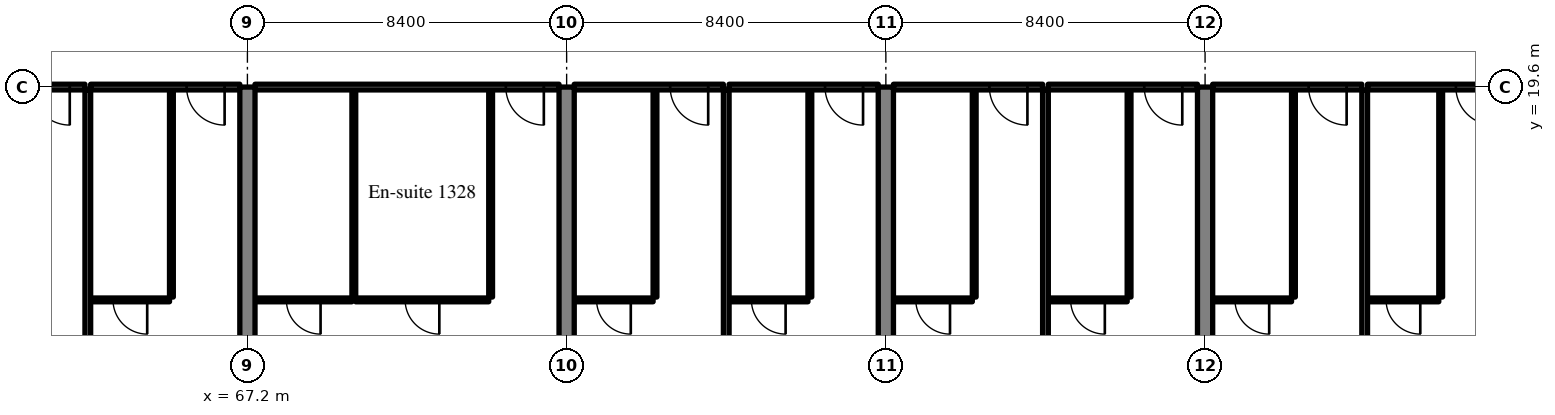
"""IFC4 building model, lengths in metres.
Left out: names, types, materials, properties, quantities, classifications, styles, units other than length and angle.
Written with IfcOpenShell. Run it as: python <this file> out.ifc"""

import sys

from ifc_helpers import new_model, si_unit, direction, frame, frame_2d, origin, place, context, subcontext, project, spatial, rectangle, extrude, source, transform, mapped, element, fill, save


model = new_model("IFC4")
c1 = context("Model", 3, precision=1e-05, world=origin(), true_north=direction((0.0, 1.0)))
c2 = subcontext(c1, "Body", "Model", "MODEL_VIEW")
j1 = project(units=[si_unit("LENGTHUNIT", "METRE"), si_unit("PLANEANGLEUNIT", "RADIAN")], contexts=[c1])
p1 = place(None, origin())
s1 = spatial("IfcSite", under=j1, at=p1, CompositionType="ELEMENT")
p2 = place(p1, origin())
s2 = spatial("IfcBuilding", under=s1, at=p2, CompositionType="ELEMENT")
p3 = place(p2, frame((0.0, 0.0, 58.2)))
s3 = spatial("IfcBuildingStorey", under=s2, at=p3, CompositionType="ELEMENT", Elevation=58.2)
m1 = source(origin(), c2, "Body", "SweptSolid", [
    extrude(rectangle(XDim=19.6, YDim=0.4, at=frame_2d((9.8, 0.0))), origin(), (0.0, 0.0, 1.0), 3.52),
])
for number, where, z_axis, x_axis in (
    (1, (67.2, 0.0, 0.0), (0.0, 0.0, 1.0), (0.0, 1.0, 0.0)),
    (2, (75.6, 0.0, 0.0), (0.0, 0.0, 1.0), (0.0, 1.0, 0.0)),
    (3, (84.0, 0.0, 0.0), (0.0, 0.0, 1.0), (0.0, 1.0, 0.0)),
    (4, (92.4, 0.0, 0.0), (0.0, 0.0, 1.0), (0.0, 1.0, 0.0)),
):
    element("IfcWall", number, at=place(p3, frame(where, z_axis=z_axis, x_axis=x_axis)), inside=s3, PredefinedType="SHEAR", context=c2, shape_type="MappedRepresentation", body=[
        mapped(m1, transform((0.0, 0.0, 0.0), scale=1.0)),
    ])
m2 = source(origin(), c2, "Body", "SweptSolid", [
    extrude(rectangle(XDim=3.925, YDim=0.15, at=frame_2d((1.962, 0.0))), origin(), (0.0, 0.0, 1.0), 2.82),
])
p4 = place(p3, frame((59.0, 19.6, 0.0), z_axis=(0.0, 0.0, 1.0), x_axis=(1.0, 0.0, 0.0)))
e5 = element("IfcWall", 5, at=p4, inside=s3, PredefinedType="PARTITIONING", context=c2, shape_type="MappedRepresentation", body=[
    mapped(m2, transform((0.0, 0.0, 0.0), scale=1.0)),
])
m3 = source(origin(), c2, "Body", "SweptSolid", [
    extrude(rectangle(XDim=1.0, YDim=2.1, at=frame_2d((0.5, 1.05))), frame((0.0, 0.085, 0.0), z_axis=(0.0, -1.0, 0.0), x_axis=(1.0, 0.0, 0.0)), (0.0, 0.0, 1.0), 0.17),
])
p5 = place(p4, frame((2.525, 0.0, 0.0)))
e6 = element("IfcOpeningElement", 6, at=p5, cuts=e5, PredefinedType="OPENING", context=c2, shape_type="MappedRepresentation", body=[
    mapped(m3, transform((0.0, 0.0, 0.0), scale=1.0)),
])
m4 = source(origin(), c2, "Body", "SweptSolid", [
    extrude(rectangle(XDim=5.45, YDim=0.1, at=frame_2d((2.725, 0.0))), origin(), (0.0, 0.0, 1.0), 3.52),
])
p6 = place(p3, frame((65.2, 14.075, 0.0), z_axis=(0.0, 0.0, 1.0), x_axis=(0.0, 1.0, 0.0)))
e7 = element("IfcWall", 7, at=p6, inside=s3, PredefinedType="PARTITIONING", context=c2, shape_type="MappedRepresentation", body=[
    mapped(m4, transform((0.0, 0.0, 0.0), scale=1.0)),
])
m5 = source(origin(), c2, "Body", "SweptSolid", [
    extrude(rectangle(XDim=2.075, YDim=0.1, at=frame_2d((1.038, 0.0))), origin(), (0.0, 0.0, 1.0), 3.52),
])
p7 = place(p3, frame((63.075, 14.0, 0.0), z_axis=(0.0, 0.0, 1.0), x_axis=(1.0, 0.0, 0.0)))
e8 = element("IfcWall", 8, at=p7, inside=s3, PredefinedType="PARTITIONING", context=c2, shape_type="MappedRepresentation", body=[
    mapped(m5, transform((0.0, 0.0, 0.0), scale=1.0)),
])
m6 = source(origin(), c2, "Body", "SweptSolid", [
    extrude(rectangle(XDim=0.9, YDim=2.1, at=frame_2d((0.45, 1.05))), frame((0.0, 0.06, 0.0), z_axis=(0.0, -1.0, 0.0), x_axis=(1.0, 0.0, 0.0)), (0.0, 0.0, 1.0), 0.12),
])
p8 = place(p7, frame((0.588, 0.0, 0.0)))
e9 = element("IfcOpeningElement", 9, at=p8, cuts=e8, PredefinedType="OPENING", context=c2, shape_type="MappedRepresentation", body=[
    mapped(m6, transform((0.0, 0.0, 0.0), scale=1.0)),
])
p9 = place(p3, frame((63.075, 19.6, 0.0), z_axis=(0.0, 0.0, 1.0), x_axis=(1.0, 0.0, 0.0)))
e10 = element("IfcWall", 10, at=p9, inside=s3, PredefinedType="PARTITIONING", context=c2, shape_type="MappedRepresentation", body=[
    mapped(m2, transform((0.0, 0.0, 0.0), scale=1.0)),
])
p10 = place(p9, frame((2.525, 0.0, 0.0)))
e11 = element("IfcOpeningElement", 11, at=p10, cuts=e10, PredefinedType="OPENING", context=c2, shape_type="MappedRepresentation", body=[
    mapped(m3, transform((0.0, 0.0, 0.0), scale=1.0)),
])
m7 = source(origin(), c2, "Body", "SweptSolid", [
    extrude(rectangle(XDim=20.998, YDim=0.15, at=frame_2d((10.499, 0.0))), origin(), (0.0, 0.0, 1.0), 3.52),
])
p11 = place(p3, frame((63.0, -1.473, 0.0), z_axis=(0.0, 0.0, 1.0), x_axis=(0.0, 1.0, 0.0)))
e12 = element("IfcWall", 12, at=p11, inside=s3, PredefinedType="PARTITIONING", context=c2, shape_type="MappedRepresentation", body=[
    mapped(m7, transform((0.0, 0.0, 0.0), scale=1.0)),
])
for number, where, z_axis, x_axis in (
    (13, (73.6, 14.075, 0.0), (0.0, 0.0, 1.0), (0.0, 1.0, 0.0)),
    (14, (70.0, 14.075, 0.0), (0.0, 0.0, 1.0), (0.0, 1.0, 0.0)),
):
    element("IfcWall", number, at=place(p3, frame(where, z_axis=z_axis, x_axis=x_axis)), inside=s3, PredefinedType="PARTITIONING", context=c2, shape_type="MappedRepresentation", body=[
        mapped(m4, transform((0.0, 0.0, 0.0), scale=1.0)),
    ])
m8 = source(origin(), c2, "Body", "SweptSolid", [
    extrude(rectangle(XDim=3.5, YDim=0.1, at=frame_2d((1.75, 0.0))), origin(), (0.0, 0.0, 1.0), 3.52),
])
p12 = place(p3, frame((70.05, 14.0, 0.0), z_axis=(0.0, 0.0, 1.0), x_axis=(1.0, 0.0, 0.0)))
e15 = element("IfcWall", 15, at=p12, inside=s3, PredefinedType="PARTITIONING", context=c2, shape_type="MappedRepresentation", body=[
    mapped(m8, transform((0.0, 0.0, 0.0), scale=1.0)),
])
p13 = place(p12, frame((1.3, 0.0, 0.0)))
e16 = element("IfcOpeningElement", 16, at=p13, cuts=e15, PredefinedType="OPENING", context=c2, shape_type="MappedRepresentation", body=[
    mapped(m6, transform((0.0, 0.0, 0.0), scale=1.0)),
])
m9 = source(origin(), c2, "Body", "SweptSolid", [
    extrude(rectangle(XDim=2.55, YDim=0.1, at=frame_2d((1.275, 0.0))), origin(), (0.0, 0.0, 1.0), 3.52),
])
p14 = place(p3, frame((67.4, 14.0, 0.0), z_axis=(0.0, 0.0, 1.0), x_axis=(1.0, 0.0, 0.0)))
e17 = element("IfcWall", 17, at=p14, inside=s3, PredefinedType="PARTITIONING", context=c2, shape_type="MappedRepresentation", body=[
    mapped(m9, transform((0.0, 0.0, 0.0), scale=1.0)),
])
p15 = place(p14, frame((0.825, 0.0, 0.0)))
e18 = element("IfcOpeningElement", 18, at=p15, cuts=e17, PredefinedType="OPENING", context=c2, shape_type="MappedRepresentation", body=[
    mapped(m6, transform((0.0, 0.0, 0.0), scale=1.0)),
])
m10 = source(origin(), c2, "Body", "SweptSolid", [
    extrude(rectangle(XDim=8.0, YDim=0.15, at=frame_2d((4.0, 0.0))), origin(), (0.0, 0.0, 1.0), 2.82),
])
p16 = place(p3, frame((67.4, 19.6, 0.0), z_axis=(0.0, 0.0, 1.0), x_axis=(1.0, 0.0, 0.0)))
e19 = element("IfcWall", 19, at=p16, inside=s3, PredefinedType="PARTITIONING", context=c2, shape_type="MappedRepresentation", body=[
    mapped(m10, transform((0.0, 0.0, 0.0), scale=1.0)),
])
p17 = place(p16, frame((6.6, 0.0, 0.0)))
e20 = element("IfcOpeningElement", 20, at=p17, cuts=e19, PredefinedType="OPENING", context=c2, shape_type="MappedRepresentation", body=[
    mapped(m3, transform((0.0, 0.0, 0.0), scale=1.0)),
])
p18 = place(p3, frame((77.925, 14.075, 0.0), z_axis=(0.0, 0.0, 1.0), x_axis=(0.0, 1.0, 0.0)))
e21 = element("IfcWall", 21, at=p18, inside=s3, PredefinedType="PARTITIONING", context=c2, shape_type="MappedRepresentation", body=[
    mapped(m4, transform((0.0, 0.0, 0.0), scale=1.0)),
])
p19 = place(p3, frame((75.8, 14.0, 0.0), z_axis=(0.0, 0.0, 1.0), x_axis=(1.0, 0.0, 0.0)))
e22 = element("IfcWall", 22, at=p19, inside=s3, PredefinedType="PARTITIONING", context=c2, shape_type="MappedRepresentation", body=[
    mapped(m5, transform((0.0, 0.0, 0.0), scale=1.0)),
])
p20 = place(p19, frame((0.588, 0.0, 0.0)))
e23 = element("IfcOpeningElement", 23, at=p20, cuts=e22, PredefinedType="OPENING", context=c2, shape_type="MappedRepresentation", body=[
    mapped(m6, transform((0.0, 0.0, 0.0), scale=1.0)),
])
p21 = place(p3, frame((75.8, 19.6, 0.0), z_axis=(0.0, 0.0, 1.0), x_axis=(1.0, 0.0, 0.0)))
e24 = element("IfcWall", 24, at=p21, inside=s3, PredefinedType="PARTITIONING", context=c2, shape_type="MappedRepresentation", body=[
    mapped(m2, transform((0.0, 0.0, 0.0), scale=1.0)),
])
p22 = place(p21, frame((2.525, 0.0, 0.0)))
e25 = element("IfcOpeningElement", 25, at=p22, cuts=e24, PredefinedType="OPENING", context=c2, shape_type="MappedRepresentation", body=[
    mapped(m3, transform((0.0, 0.0, 0.0), scale=1.0)),
])
p23 = place(p3, frame((82.0, 14.075, 0.0), z_axis=(0.0, 0.0, 1.0), x_axis=(0.0, 1.0, 0.0)))
e26 = element("IfcWall", 26, at=p23, inside=s3, PredefinedType="PARTITIONING", context=c2, shape_type="MappedRepresentation", body=[
    mapped(m4, transform((0.0, 0.0, 0.0), scale=1.0)),
])
p24 = place(p3, frame((79.875, 14.0, 0.0), z_axis=(0.0, 0.0, 1.0), x_axis=(1.0, 0.0, 0.0)))
e27 = element("IfcWall", 27, at=p24, inside=s3, PredefinedType="PARTITIONING", context=c2, shape_type="MappedRepresentation", body=[
    mapped(m5, transform((0.0, 0.0, 0.0), scale=1.0)),
])
p25 = place(p24, frame((0.587, 0.0, 0.0)))
e28 = element("IfcOpeningElement", 28, at=p25, cuts=e27, PredefinedType="OPENING", context=c2, shape_type="MappedRepresentation", body=[
    mapped(m6, transform((0.0, 0.0, 0.0), scale=1.0)),
])
p26 = place(p3, frame((79.875, 19.6, 0.0), z_axis=(0.0, 0.0, 1.0), x_axis=(1.0, 0.0, 0.0)))
e29 = element("IfcWall", 29, at=p26, inside=s3, PredefinedType="PARTITIONING", context=c2, shape_type="MappedRepresentation", body=[
    mapped(m2, transform((0.0, 0.0, 0.0), scale=1.0)),
])
p27 = place(p26, frame((2.525, 0.0, 0.0)))
e30 = element("IfcOpeningElement", 30, at=p27, cuts=e29, PredefinedType="OPENING", context=c2, shape_type="MappedRepresentation", body=[
    mapped(m3, transform((0.0, 0.0, 0.0), scale=1.0)),
])
m11 = source(origin(), c2, "Body", "SweptSolid", [
    extrude(rectangle(XDim=18.725, YDim=0.15, at=frame_2d((9.362, 0.0))), origin(), (0.0, 0.0, 1.0), 3.52),
])
p28 = place(p3, frame((79.8, 0.8, 0.0), z_axis=(0.0, 0.0, 1.0), x_axis=(0.0, 1.0, 0.0)))
e31 = element("IfcWall", 31, at=p28, inside=s3, PredefinedType="PARTITIONING", context=c2, shape_type="MappedRepresentation", body=[
    mapped(m11, transform((0.0, 0.0, 0.0), scale=1.0)),
])
p29 = place(p3, frame((86.325, 14.075, 0.0), z_axis=(0.0, 0.0, 1.0), x_axis=(0.0, 1.0, 0.0)))
e32 = element("IfcWall", 32, at=p29, inside=s3, PredefinedType="PARTITIONING", context=c2, shape_type="MappedRepresentation", body=[
    mapped(m4, transform((0.0, 0.0, 0.0), scale=1.0)),
])
p30 = place(p3, frame((84.2, 14.0, 0.0), z_axis=(0.0, 0.0, 1.0), x_axis=(1.0, 0.0, 0.0)))
e33 = element("IfcWall", 33, at=p30, inside=s3, PredefinedType="PARTITIONING", context=c2, shape_type="MappedRepresentation", body=[
    mapped(m5, transform((0.0, 0.0, 0.0), scale=1.0)),
])
p31 = place(p30, frame((0.588, 0.0, 0.0)))
e34 = element("IfcOpeningElement", 34, at=p31, cuts=e33, PredefinedType="OPENING", context=c2, shape_type="MappedRepresentation", body=[
    mapped(m6, transform((0.0, 0.0, 0.0), scale=1.0)),
])
p32 = place(p3, frame((84.2, 19.6, 0.0), z_axis=(0.0, 0.0, 1.0), x_axis=(1.0, 0.0, 0.0)))
e35 = element("IfcWall", 35, at=p32, inside=s3, PredefinedType="PARTITIONING", context=c2, shape_type="MappedRepresentation", body=[
    mapped(m2, transform((0.0, 0.0, 0.0), scale=1.0)),
])
p33 = place(p32, frame((2.525, 0.0, 0.0)))
e36 = element("IfcOpeningElement", 36, at=p33, cuts=e35, PredefinedType="OPENING", context=c2, shape_type="MappedRepresentation", body=[
    mapped(m3, transform((0.0, 0.0, 0.0), scale=1.0)),
])
p34 = place(p3, frame((90.4, 14.075, 0.0), z_axis=(0.0, 0.0, 1.0), x_axis=(0.0, 1.0, 0.0)))
e37 = element("IfcWall", 37, at=p34, inside=s3, PredefinedType="PARTITIONING", context=c2, shape_type="MappedRepresentation", body=[
    mapped(m4, transform((0.0, 0.0, 0.0), scale=1.0)),
])
m12 = source(origin(), c2, "Body", "SweptSolid", [
    extrude(rectangle(XDim=2.075, YDim=0.1, at=frame_2d((1.038, 0.0))), origin(), (0.0, 0.0, 1.0), 3.52),
])
p35 = place(p3, frame((88.275, 14.0, 0.0), z_axis=(0.0, 0.0, 1.0), x_axis=(1.0, 0.0, 0.0)))
e38 = element("IfcWall", 38, at=p35, inside=s3, PredefinedType="PARTITIONING", context=c2, shape_type="MappedRepresentation", body=[
    mapped(m12, transform((0.0, 0.0, 0.0), scale=1.0)),
])
p36 = place(p35, frame((0.587, 0.0, 0.0)))
e39 = element("IfcOpeningElement", 39, at=p36, cuts=e38, PredefinedType="OPENING", context=c2, shape_type="MappedRepresentation", body=[
    mapped(m6, transform((0.0, 0.0, 0.0), scale=1.0)),
])
p37 = place(p3, frame((88.275, 19.6, 0.0), z_axis=(0.0, 0.0, 1.0), x_axis=(1.0, 0.0, 0.0)))
e40 = element("IfcWall", 40, at=p37, inside=s3, PredefinedType="PARTITIONING", context=c2, shape_type="MappedRepresentation", body=[
    mapped(m2, transform((0.0, 0.0, 0.0), scale=1.0)),
])
p38 = place(p37, frame((2.525, 0.0, 0.0)))
e41 = element("IfcOpeningElement", 41, at=p38, cuts=e40, PredefinedType="OPENING", context=c2, shape_type="MappedRepresentation", body=[
    mapped(m3, transform((0.0, 0.0, 0.0), scale=1.0)),
])
p39 = place(p3, frame((88.2, 0.8, 0.0), z_axis=(0.0, 0.0, 1.0), x_axis=(0.0, 1.0, 0.0)))
e42 = element("IfcWall", 42, at=p39, inside=s3, PredefinedType="PARTITIONING", context=c2, shape_type="MappedRepresentation", body=[
    mapped(m11, transform((0.0, 0.0, 0.0), scale=1.0)),
])
p40 = place(p3, frame((94.725, 14.075, 0.0), z_axis=(0.0, 0.0, 1.0), x_axis=(0.0, 1.0, 0.0)))
e43 = element("IfcWall", 43, at=p40, inside=s3, PredefinedType="PARTITIONING", context=c2, shape_type="MappedRepresentation", body=[
    mapped(m4, transform((0.0, 0.0, 0.0), scale=1.0)),
])
p41 = place(p3, frame((92.6, 14.0, 0.0), z_axis=(0.0, 0.0, 1.0), x_axis=(1.0, 0.0, 0.0)))
e44 = element("IfcWall", 44, at=p41, inside=s3, PredefinedType="PARTITIONING", context=c2, shape_type="MappedRepresentation", body=[
    mapped(m5, transform((0.0, 0.0, 0.0), scale=1.0)),
])
p42 = place(p41, frame((0.587, 0.0, 0.0)))
e45 = element("IfcOpeningElement", 45, at=p42, cuts=e44, PredefinedType="OPENING", context=c2, shape_type="MappedRepresentation", body=[
    mapped(m6, transform((0.0, 0.0, 0.0), scale=1.0)),
])
m13 = source(origin(), c2, "Body", "SweptSolid", [
    extrude(rectangle(XDim=3.925, YDim=0.15, at=frame_2d((1.962, 0.0))), origin(), (0.0, 0.0, 1.0), 2.82),
])
p43 = place(p3, frame((92.6, 19.6, 0.0), z_axis=(0.0, 0.0, 1.0), x_axis=(1.0, 0.0, 0.0)))
e46 = element("IfcWall", 46, at=p43, inside=s3, PredefinedType="PARTITIONING", context=c2, shape_type="MappedRepresentation", body=[
    mapped(m13, transform((0.0, 0.0, 0.0), scale=1.0)),
])
p44 = place(p43, frame((2.525, 0.0, 0.0)))
e47 = element("IfcOpeningElement", 47, at=p44, cuts=e46, PredefinedType="OPENING", context=c2, shape_type="MappedRepresentation", body=[
    mapped(m3, transform((0.0, 0.0, 0.0), scale=1.0)),
])
p45 = place(p3, frame((98.6, 14.075, 0.0), z_axis=(0.0, 0.0, 1.0), x_axis=(0.0, 1.0, 0.0)))
e48 = element("IfcWall", 48, at=p45, inside=s3, PredefinedType="PARTITIONING", context=c2, shape_type="MappedRepresentation", body=[
    mapped(m4, transform((0.0, 0.0, 0.0), scale=1.0)),
])
m14 = source(origin(), c2, "Body", "SweptSolid", [
    extrude(rectangle(XDim=1.875, YDim=0.1, at=frame_2d((0.938, 0.0))), origin(), (0.0, 0.0, 1.0), 3.52),
])
p46 = place(p3, frame((96.675, 14.0, 0.0), z_axis=(0.0, 0.0, 1.0), x_axis=(1.0, 0.0, 0.0)))
e49 = element("IfcWall", 49, at=p46, inside=s3, PredefinedType="PARTITIONING", context=c2, shape_type="MappedRepresentation", body=[
    mapped(m14, transform((0.0, 0.0, 0.0), scale=1.0)),
])
p47 = place(p46, frame((0.488, 0.0, 0.0)))
e50 = element("IfcOpeningElement", 50, at=p47, cuts=e49, PredefinedType="OPENING", context=c2, shape_type="MappedRepresentation", body=[
    mapped(m6, transform((0.0, 0.0, 0.0), scale=1.0)),
])
m15 = source(origin(), c2, "Body", "SweptSolid", [
    extrude(rectangle(XDim=3.725, YDim=0.15, at=frame_2d((1.862, 0.0))), origin(), (0.0, 0.0, 1.0), 2.82),
])
p48 = place(p3, frame((96.675, 19.6, 0.0), z_axis=(0.0, 0.0, 1.0), x_axis=(1.0, 0.0, 0.0)))
e51 = element("IfcWall", 51, at=p48, inside=s3, PredefinedType="PARTITIONING", context=c2, shape_type="MappedRepresentation", body=[
    mapped(m15, transform((0.0, 0.0, 0.0), scale=1.0)),
])
p49 = place(p48, frame((2.325, 0.0, 0.0)))
e52 = element("IfcOpeningElement", 52, at=p49, cuts=e51, PredefinedType="OPENING", context=c2, shape_type="MappedRepresentation", body=[
    mapped(m3, transform((0.0, 0.0, 0.0), scale=1.0)),
])
m16 = source(origin(), c2, "Body", "SweptSolid", [
    extrude(rectangle(XDim=18.947, YDim=0.15, at=frame_2d((9.474, 0.0))), origin(), (0.0, 0.0, 1.0), 3.52),
])
p50 = place(p3, frame((96.6, 0.578, 0.0), z_axis=(0.0, 0.0, 1.0), x_axis=(0.0, 1.0, 0.0)))
e53 = element("IfcWall", 53, at=p50, inside=s3, PredefinedType="PARTITIONING", context=c2, shape_type="MappedRepresentation", body=[
    mapped(m16, transform((0.0, 0.0, 0.0), scale=1.0)),
])
m17 = source(origin(), c2, "Body", "SweptSolid", [
    extrude(rectangle(XDim=1.0, YDim=2.1, at=frame_2d((0.5, 1.05))), frame((0.0, 0.025, 0.0), z_axis=(0.0, -1.0, 0.0), x_axis=(1.0, 0.0, 0.0)), (0.0, 0.0, 1.0), 0.05),
])
p51 = place(p5, origin())
e54 = element("IfcDoor", 54, at=p51, inside=s3, OperationType="SINGLE_SWING_RIGHT", PredefinedType="DOOR", context=c2, shape_type="MappedRepresentation", body=[
    mapped(m17, transform((0.0, 0.0, 0.0), scale=1.0)),
])
fill(e6, e54)
m18 = source(origin(), c2, "Body", "SweptSolid", [
    extrude(rectangle(XDim=0.9, YDim=2.1, at=frame_2d((0.45, 1.05))), frame((0.0, 0.025, 0.0), z_axis=(0.0, -1.0, 0.0), x_axis=(1.0, 0.0, 0.0)), (0.0, 0.0, 1.0), 0.05),
])
p52 = place(p8, origin())
e55 = element("IfcDoor", 55, at=p52, inside=s3, OperationType="SINGLE_SWING_RIGHT", PredefinedType="DOOR", context=c2, shape_type="MappedRepresentation", body=[
    mapped(m18, transform((0.0, 0.0, 0.0), scale=1.0)),
])
fill(e9, e55)
p53 = place(p10, origin())
e56 = element("IfcDoor", 56, at=p53, inside=s3, OperationType="SINGLE_SWING_RIGHT", PredefinedType="DOOR", context=c2, shape_type="MappedRepresentation", body=[
    mapped(m17, transform((0.0, 0.0, 0.0), scale=1.0)),
])
fill(e11, e56)
p54 = place(p13, origin())
e57 = element("IfcDoor", 57, at=p54, inside=s3, OperationType="SINGLE_SWING_RIGHT", PredefinedType="DOOR", context=c2, shape_type="MappedRepresentation", body=[
    mapped(m18, transform((0.0, 0.0, 0.0), scale=1.0)),
])
fill(e16, e57)
p55 = place(p15, origin())
e58 = element("IfcDoor", 58, at=p55, inside=s3, OperationType="SINGLE_SWING_RIGHT", PredefinedType="DOOR", context=c2, shape_type="MappedRepresentation", body=[
    mapped(m18, transform((0.0, 0.0, 0.0), scale=1.0)),
])
fill(e18, e58)
p56 = place(p17, origin())
e59 = element("IfcDoor", 59, at=p56, inside=s3, OperationType="SINGLE_SWING_RIGHT", PredefinedType="DOOR", context=c2, shape_type="MappedRepresentation", body=[
    mapped(m17, transform((0.0, 0.0, 0.0), scale=1.0)),
])
fill(e20, e59)
p57 = place(p20, origin())
e60 = element("IfcDoor", 60, at=p57, inside=s3, OperationType="SINGLE_SWING_RIGHT", PredefinedType="DOOR", context=c2, shape_type="MappedRepresentation", body=[
    mapped(m18, transform((0.0, 0.0, 0.0), scale=1.0)),
])
fill(e23, e60)
p58 = place(p22, origin())
e61 = element("IfcDoor", 61, at=p58, inside=s3, OperationType="SINGLE_SWING_RIGHT", PredefinedType="DOOR", context=c2, shape_type="MappedRepresentation", body=[
    mapped(m17, transform((0.0, 0.0, 0.0), scale=1.0)),
])
fill(e25, e61)
p59 = place(p25, origin())
e62 = element("IfcDoor", 62, at=p59, inside=s3, OperationType="SINGLE_SWING_RIGHT", PredefinedType="DOOR", context=c2, shape_type="MappedRepresentation", body=[
    mapped(m18, transform((0.0, 0.0, 0.0), scale=1.0)),
])
fill(e28, e62)
p60 = place(p27, origin())
e63 = element("IfcDoor", 63, at=p60, inside=s3, OperationType="SINGLE_SWING_RIGHT", PredefinedType="DOOR", context=c2, shape_type="MappedRepresentation", body=[
    mapped(m17, transform((0.0, 0.0, 0.0), scale=1.0)),
])
fill(e30, e63)
p61 = place(p31, origin())
e64 = element("IfcDoor", 64, at=p61, inside=s3, OperationType="SINGLE_SWING_RIGHT", PredefinedType="DOOR", context=c2, shape_type="MappedRepresentation", body=[
    mapped(m18, transform((0.0, 0.0, 0.0), scale=1.0)),
])
fill(e34, e64)
p62 = place(p33, origin())
e65 = element("IfcDoor", 65, at=p62, inside=s3, OperationType="SINGLE_SWING_RIGHT", PredefinedType="DOOR", context=c2, shape_type="MappedRepresentation", body=[
    mapped(m17, transform((0.0, 0.0, 0.0), scale=1.0)),
])
fill(e36, e65)
p63 = place(p36, origin())
e66 = element("IfcDoor", 66, at=p63, inside=s3, OperationType="SINGLE_SWING_RIGHT", PredefinedType="DOOR", context=c2, shape_type="MappedRepresentation", body=[
    mapped(m18, transform((0.0, 0.0, 0.0), scale=1.0)),
])
fill(e39, e66)
p64 = place(p38, origin())
e67 = element("IfcDoor", 67, at=p64, inside=s3, OperationType="SINGLE_SWING_RIGHT", PredefinedType="DOOR", context=c2, shape_type="MappedRepresentation", body=[
    mapped(m17, transform((0.0, 0.0, 0.0), scale=1.0)),
])
fill(e41, e67)
p65 = place(p42, origin())
e68 = element("IfcDoor", 68, at=p65, inside=s3, OperationType="SINGLE_SWING_RIGHT", PredefinedType="DOOR", context=c2, shape_type="MappedRepresentation", body=[
    mapped(m18, transform((0.0, 0.0, 0.0), scale=1.0)),
])
fill(e45, e68)
p66 = place(p44, origin())
e69 = element("IfcDoor", 69, at=p66, inside=s3, OperationType="SINGLE_SWING_RIGHT", PredefinedType="DOOR", context=c2, shape_type="MappedRepresentation", body=[
    mapped(m17, transform((0.0, 0.0, 0.0), scale=1.0)),
])
fill(e47, e69)
p67 = place(p47, origin())
e70 = element("IfcDoor", 70, at=p67, inside=s3, OperationType="SINGLE_SWING_RIGHT", PredefinedType="DOOR", context=c2, shape_type="MappedRepresentation", body=[
    mapped(m18, transform((0.0, 0.0, 0.0), scale=1.0)),
])
fill(e50, e70)
p68 = place(p49, origin())
e71 = element("IfcDoor", 71, at=p68, inside=s3, OperationType="SINGLE_SWING_RIGHT", PredefinedType="DOOR", context=c2, shape_type="MappedRepresentation", body=[
    mapped(m17, transform((0.0, 0.0, 0.0), scale=1.0)),
])
fill(e52, e71)
save(model, sys.argv[1])
